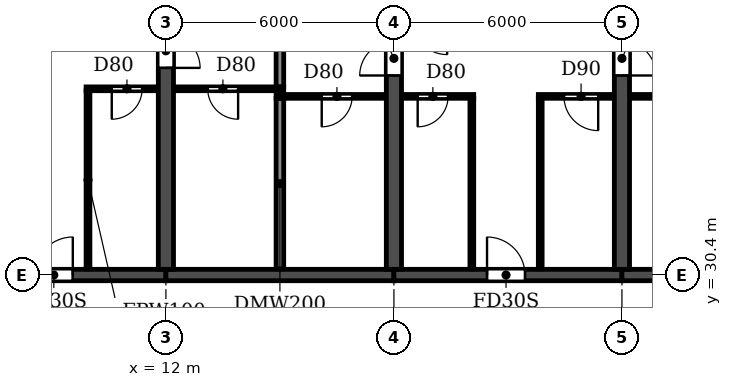
"""IFC4 building model, lengths in metres.
Left out: names, types, materials, properties, quantities, classifications, styles, units other than length and angle.
Written with IfcOpenShell. Run it as: python <this file> out.ifc"""

import sys

from ifc_helpers import new_model, si_unit, direction, frame, frame_2d, origin, place, context, subcontext, project, spatial, rectangle, extrude, element, fill, save


model = new_model("IFC4")
c1 = context("Model", 3, precision=1e-05, world=origin(), true_north=direction((0.0, 1.0)))
c2 = subcontext(c1, "Body", "Model", "MODEL_VIEW")
j1 = project(units=[si_unit("LENGTHUNIT", "METRE"), si_unit("PLANEANGLEUNIT", "RADIAN")], contexts=[c1])
p1 = place(None, origin())
s1 = spatial("IfcSite", under=j1, at=p1, CompositionType="ELEMENT")
p2 = place(p1, origin())
s2 = spatial("IfcBuilding", under=s1, at=p2, CompositionType="ELEMENT")
p3 = place(p2, frame((0.0, 0.0, 43.2)))
s3 = spatial("IfcBuildingStorey", under=s2, at=p3, CompositionType="ELEMENT", Elevation=43.2)
p4 = place(p3, frame((12.0, 30.55, 0.0), z_axis=(0.0, 0.0, 1.0), x_axis=(0.0, 1.0, 0.0)))
e1 = element("IfcWall", 1, at=p4, inside=s3, PredefinedType="SHEAR", context=c2, shape_type="SweptSolid", body=[
    extrude(rectangle(XDim=14.05, YDim=0.4, at=frame_2d((7.025, 0.0))), origin(), (0.0, 0.0, 1.0), 3.05),
])
p5 = place(p4, frame((5.3, 0.0, 0.0)))
e2 = element("IfcOpeningElement", 2, at=p5, cuts=e1, PredefinedType="OPENING", context=c2, shape_type="SweptSolid", body=[
    extrude(rectangle(XDim=0.9, YDim=2.1, at=frame_2d((0.45, 1.05))), frame((0.0, 0.21, 0.0), z_axis=(0.0, -1.0, 0.0), x_axis=(1.0, 0.0, 0.0)), (0.0, 0.0, 1.0), 0.42),
])
p6 = place(p3, frame((18.0, 30.55, 0.0), z_axis=(0.0, 0.0, 1.0), x_axis=(0.0, 1.0, 0.0)))
e3 = element("IfcWall", 3, at=p6, inside=s3, PredefinedType="SHEAR", context=c2, shape_type="SweptSolid", body=[
    extrude(rectangle(XDim=14.05, YDim=0.4, at=frame_2d((7.025, 0.0))), origin(), (0.0, 0.0, 1.0), 3.05),
])
p7 = place(p6, frame((5.1, 0.0, 0.0)))
e4 = element("IfcOpeningElement", 4, at=p7, cuts=e3, PredefinedType="OPENING", context=c2, shape_type="SweptSolid", body=[
    extrude(rectangle(XDim=0.9, YDim=2.1, at=frame_2d((0.45, 1.05))), frame((0.0, 0.21, 0.0), z_axis=(0.0, -1.0, 0.0), x_axis=(1.0, 0.0, 0.0)), (0.0, 0.0, 1.0), 0.42),
])
p8 = place(p3, frame((24.0, 30.55, 0.0), z_axis=(0.0, 0.0, 1.0), x_axis=(0.0, 1.0, 0.0)))
e5 = element("IfcWall", 5, at=p8, inside=s3, PredefinedType="SHEAR", context=c2, shape_type="SweptSolid", body=[
    extrude(rectangle(XDim=14.05, YDim=0.4, at=frame_2d((7.025, 0.0))), origin(), (0.0, 0.0, 1.0), 3.05),
])
p9 = place(p8, frame((5.1, 0.0, 0.0)))
e6 = element("IfcOpeningElement", 6, at=p9, cuts=e5, PredefinedType="OPENING", context=c2, shape_type="SweptSolid", body=[
    extrude(rectangle(XDim=0.9, YDim=2.1, at=frame_2d((0.45, 1.05))), frame((0.0, 0.21, 0.0), z_axis=(0.0, -1.0, 0.0), x_axis=(1.0, 0.0, 0.0)), (0.0, 0.0, 1.0), 0.42),
])
p10 = place(p3, frame((6.0, 30.4, 0.0), z_axis=(0.0, 0.0, 1.0), x_axis=(1.0, 0.0, 0.0)))
e7 = element("IfcWall", 7, at=p10, inside=s3, PredefinedType="SHEAR", context=c2, shape_type="SweptSolid", body=[
    extrude(rectangle(XDim=6.0, YDim=0.3, at=frame_2d((3.0, 0.0))), origin(), (0.0, 0.0, 1.0), 2.45),
])
p11 = place(p10, frame((2.55, 0.0, 0.0)))
e8 = element("IfcOpeningElement", 8, at=p11, cuts=e7, PredefinedType="OPENING", context=c2, shape_type="SweptSolid", body=[
    extrude(rectangle(XDim=1.0, YDim=2.1, at=frame_2d((0.5, 1.05))), frame((0.0, 0.16, 0.0), z_axis=(0.0, -1.0, 0.0), x_axis=(1.0, 0.0, 0.0)), (0.0, 0.0, 1.0), 0.32),
])
p12 = place(p3, frame((12.0, 30.4, 0.0), z_axis=(0.0, 0.0, 1.0), x_axis=(1.0, 0.0, 0.0)))
e9 = element("IfcWall", 9, at=p12, inside=s3, PredefinedType="SHEAR", context=c2, shape_type="SweptSolid", body=[
    extrude(rectangle(XDim=6.0, YDim=0.3, at=frame_2d((3.0, 0.0))), origin(), (0.0, 0.0, 1.0), 2.45),
])
p13 = place(p3, frame((18.0, 30.4, 0.0), z_axis=(0.0, 0.0, 1.0), x_axis=(1.0, 0.0, 0.0)))
e10 = element("IfcWall", 10, at=p13, inside=s3, PredefinedType="SHEAR", context=c2, shape_type="SweptSolid", body=[
    extrude(rectangle(XDim=6.0, YDim=0.3, at=frame_2d((3.0, 0.0))), origin(), (0.0, 0.0, 1.0), 2.45),
])
p14 = place(p13, frame((2.45, 0.0, 0.0)))
e11 = element("IfcOpeningElement", 11, at=p14, cuts=e10, PredefinedType="OPENING", context=c2, shape_type="SweptSolid", body=[
    extrude(rectangle(XDim=1.0, YDim=2.1, at=frame_2d((0.5, 1.05))), frame((0.0, 0.16, 0.0), z_axis=(0.0, -1.0, 0.0), x_axis=(1.0, 0.0, 0.0)), (0.0, 0.0, 1.0), 0.32),
])
p15 = place(p3, frame((24.0, 30.4, 0.0), z_axis=(0.0, 0.0, 1.0), x_axis=(1.0, 0.0, 0.0)))
e12 = element("IfcWall", 12, at=p15, inside=s3, PredefinedType="SHEAR", context=c2, shape_type="SweptSolid", body=[
    extrude(rectangle(XDim=6.0, YDim=0.3, at=frame_2d((3.0, 0.0))), origin(), (0.0, 0.0, 1.0), 2.45),
])
p16 = place(p3, frame((15.0, 30.56, 0.0), z_axis=(0.0, 0.0, 1.0), x_axis=(0.0, 1.0, 0.0)))
e13 = element("IfcWall", 13, at=p16, inside=s3, PredefinedType="PARTITIONING", context=c2, shape_type="SweptSolid", body=[
    extrude(rectangle(XDim=4.49, YDim=0.2, at=frame_2d((2.245, 0.0))), origin(), (0.0, 0.0, 1.0), 3.05),
])
p17 = place(p3, frame((15.0, 35.35, 0.0), z_axis=(0.0, 0.0, 1.0), x_axis=(0.0, 1.0, 0.0)))
e14 = element("IfcWall", 14, at=p17, inside=s3, PredefinedType="PARTITIONING", context=c2, shape_type="SweptSolid", body=[
    extrude(rectangle(XDim=9.39, YDim=0.2, at=frame_2d((4.695, 0.0))), origin(), (0.0, 0.0, 1.0), 3.05),
])
p18 = place(p3, frame((14.9, 35.1, 0.0), z_axis=(0.0, 0.0, 1.0), x_axis=(1.0, 0.0, 0.0)))
e15 = element("IfcWall", 15, at=p18, inside=s3, PredefinedType="PARTITIONING", context=c2, shape_type="SweptSolid", body=[
    extrude(rectangle(XDim=2.89, YDim=0.1, at=frame_2d((1.445, 0.0))), origin(), (0.0, 0.0, 1.0), 3.05),
])
p19 = place(p18, frame((1.2, 0.0, 0.0)))
e16 = element("IfcOpeningElement", 16, at=p19, cuts=e15, PredefinedType="OPENING", context=c2, shape_type="SweptSolid", body=[
    extrude(rectangle(XDim=0.8, YDim=2.1, at=frame_2d((0.4, 1.05))), frame((0.0, 0.06, 0.0), z_axis=(0.0, -1.0, 0.0), x_axis=(1.0, 0.0, 0.0)), (0.0, 0.0, 1.0), 0.12),
])
p20 = place(p3, frame((18.21, 35.1, 0.0), z_axis=(0.0, 0.0, 1.0), x_axis=(1.0, 0.0, 0.0)))
e17 = element("IfcWall", 17, at=p20, inside=s3, PredefinedType="PARTITIONING", context=c2, shape_type="SweptSolid", body=[
    extrude(rectangle(XDim=1.89, YDim=0.1, at=frame_2d((0.945, 0.0))), origin(), (0.0, 0.0, 1.0), 3.05),
])
p21 = place(p20, frame((0.415, 0.0, 0.0)))
e18 = element("IfcOpeningElement", 18, at=p21, cuts=e17, PredefinedType="OPENING", context=c2, shape_type="SweptSolid", body=[
    extrude(rectangle(XDim=0.8, YDim=2.1, at=frame_2d((0.4, 1.05))), frame((0.0, 0.06, 0.0), z_axis=(0.0, -1.0, 0.0), x_axis=(1.0, 0.0, 0.0)), (0.0, 0.0, 1.0), 0.12),
])
p22 = place(p3, frame((21.8, 35.1, 0.0), z_axis=(0.0, 0.0, 1.0), x_axis=(1.0, 0.0, 0.0)))
e19 = element("IfcWall", 19, at=p22, inside=s3, PredefinedType="PARTITIONING", context=c2, shape_type="SweptSolid", body=[
    extrude(rectangle(XDim=1.99, YDim=0.1, at=frame_2d((0.995, 0.0))), origin(), (0.0, 0.0, 1.0), 3.05),
])
p23 = place(p22, frame((0.675, 0.0, 0.0)))
e20 = element("IfcOpeningElement", 20, at=p23, cuts=e19, PredefinedType="OPENING", context=c2, shape_type="SweptSolid", body=[
    extrude(rectangle(XDim=0.9, YDim=2.1, at=frame_2d((0.45, 1.05))), frame((0.0, 0.06, 0.0), z_axis=(0.0, -1.0, 0.0), x_axis=(1.0, 0.0, 0.0)), (0.0, 0.0, 1.0), 0.12),
])
p24 = place(p3, frame((24.21, 35.1, 0.0), z_axis=(0.0, 0.0, 1.0), x_axis=(1.0, 0.0, 0.0)))
e21 = element("IfcWall", 21, at=p24, inside=s3, PredefinedType="PARTITIONING", context=c2, shape_type="SweptSolid", body=[
    extrude(rectangle(XDim=2.69, YDim=0.1, at=frame_2d((1.345, 0.0))), origin(), (0.0, 0.0, 1.0), 3.05),
])
p25 = place(p24, frame((0.89, 0.0, 0.0)))
e22 = element("IfcOpeningElement", 22, at=p25, cuts=e21, PredefinedType="OPENING", context=c2, shape_type="SweptSolid", body=[
    extrude(rectangle(XDim=0.8, YDim=2.1, at=frame_2d((0.4, 1.05))), frame((0.0, 0.06, 0.0), z_axis=(0.0, -1.0, 0.0), x_axis=(1.0, 0.0, 0.0)), (0.0, 0.0, 1.0), 0.12),
])
p26 = place(p3, frame((9.9, 35.3, 0.0), z_axis=(0.0, 0.0, 1.0), x_axis=(1.0, 0.0, 0.0)))
e23 = element("IfcWall", 23, at=p26, inside=s3, PredefinedType="PARTITIONING", context=c2, shape_type="SweptSolid", body=[
    extrude(rectangle(XDim=1.89, YDim=0.1, at=frame_2d((0.945, 0.0))), origin(), (0.0, 0.0, 1.0), 3.05),
])
p27 = place(p26, frame((0.675, 0.0, 0.0)))
e24 = element("IfcOpeningElement", 24, at=p27, cuts=e23, PredefinedType="OPENING", context=c2, shape_type="SweptSolid", body=[
    extrude(rectangle(XDim=0.8, YDim=2.1, at=frame_2d((0.4, 1.05))), frame((0.0, 0.06, 0.0), z_axis=(0.0, -1.0, 0.0), x_axis=(1.0, 0.0, 0.0)), (0.0, 0.0, 1.0), 0.12),
])
p28 = place(p3, frame((12.21, 35.3, 0.0), z_axis=(0.0, 0.0, 1.0), x_axis=(1.0, 0.0, 0.0)))
e25 = element("IfcWall", 25, at=p28, inside=s3, PredefinedType="PARTITIONING", context=c2, shape_type="SweptSolid", body=[
    extrude(rectangle(XDim=2.89, YDim=0.1, at=frame_2d((1.445, 0.0))), origin(), (0.0, 0.0, 1.0), 3.05),
])
p29 = place(p28, frame((0.89, 0.0, 0.0)))
e26 = element("IfcOpeningElement", 26, at=p29, cuts=e25, PredefinedType="OPENING", context=c2, shape_type="SweptSolid", body=[
    extrude(rectangle(XDim=0.8, YDim=2.1, at=frame_2d((0.4, 1.05))), frame((0.0, 0.06, 0.0), z_axis=(0.0, -1.0, 0.0), x_axis=(1.0, 0.0, 0.0)), (0.0, 0.0, 1.0), 0.12),
])
p30 = place(p3, frame((9.95, 30.56, 0.0), z_axis=(0.0, 0.0, 1.0), x_axis=(0.0, 1.0, 0.0)))
e27 = element("IfcWall", 27, at=p30, inside=s3, PredefinedType="PARTITIONING", context=c2, shape_type="SweptSolid", body=[
    extrude(rectangle(XDim=4.69, YDim=0.1, at=frame_2d((2.345, 0.0))), origin(), (0.0, 0.0, 1.0), 3.05),
])
for number, where, z_axis, x_axis in (
    (28, (20.05, 30.56, 0.0), (0.0, 0.0, 1.0), (0.0, 1.0, 0.0)),
    (29, (21.85, 30.56, 0.0), (0.0, 0.0, 1.0), (0.0, 1.0, 0.0)),
):
    element("IfcWall", number, at=place(p3, frame(where, z_axis=z_axis, x_axis=x_axis)), inside=s3, PredefinedType="PARTITIONING", context=c2, shape_type="SweptSolid", body=[
        extrude(rectangle(XDim=4.49, YDim=0.1, at=frame_2d((2.245, 0.0))), origin(), (0.0, 0.0, 1.0), 3.05),
    ])
p31 = place(p29, frame((0.8, 0.0, 0.0), z_axis=(0.0, 0.0, 1.0), x_axis=(-1.0, 0.0, 0.0)))
e30 = element("IfcDoor", 30, at=p31, inside=s3, OperationType="SINGLE_SWING_LEFT", PredefinedType="DOOR", context=c2, shape_type="SweptSolid", body=[
    extrude(rectangle(XDim=0.8, YDim=2.1, at=frame_2d((0.4, 1.05))), frame((0.0, 0.025, 0.0), z_axis=(0.0, -1.0, 0.0), x_axis=(1.0, 0.0, 0.0)), (0.0, 0.0, 1.0), 0.05),
])
fill(e26, e30)
p32 = place(p11, origin())
e31 = element("IfcDoor", 31, at=p32, inside=s3, OperationType="SINGLE_SWING_RIGHT", PredefinedType="DOOR", context=c2, shape_type="SweptSolid", body=[
    extrude(rectangle(XDim=1.0, YDim=2.1, at=frame_2d((0.5, 1.05))), frame((0.0, 0.025, 0.0), z_axis=(0.0, -1.0, 0.0), x_axis=(1.0, 0.0, 0.0)), (0.0, 0.0, 1.0), 0.05),
])
fill(e8, e31)
p33 = place(p27, frame((0.8, 0.0, 0.0), z_axis=(0.0, 0.0, 1.0), x_axis=(-1.0, 0.0, 0.0)))
e32 = element("IfcDoor", 32, at=p33, inside=s3, OperationType="SINGLE_SWING_RIGHT", PredefinedType="DOOR", context=c2, shape_type="SweptSolid", body=[
    extrude(rectangle(XDim=0.8, YDim=2.1, at=frame_2d((0.4, 1.05))), frame((0.0, 0.025, 0.0), z_axis=(0.0, -1.0, 0.0), x_axis=(1.0, 0.0, 0.0)), (0.0, 0.0, 1.0), 0.05),
])
fill(e24, e32)
p34 = place(p5, frame((0.9, 0.0, 0.0), z_axis=(0.0, 0.0, 1.0), x_axis=(-1.0, 0.0, 0.0)))
e33 = element("IfcDoor", 33, at=p34, inside=s3, OperationType="SINGLE_SWING_RIGHT", PredefinedType="DOOR", context=c2, shape_type="SweptSolid", body=[
    extrude(rectangle(XDim=0.9, YDim=2.1, at=frame_2d((0.45, 1.05))), frame((0.0, 0.025, 0.0), z_axis=(0.0, -1.0, 0.0), x_axis=(1.0, 0.0, 0.0)), (0.0, 0.0, 1.0), 0.05),
])
fill(e2, e33)
p35 = place(p19, frame((0.8, 0.0, 0.0), z_axis=(0.0, 0.0, 1.0), x_axis=(-1.0, 0.0, 0.0)))
e34 = element("IfcDoor", 34, at=p35, inside=s3, OperationType="SINGLE_SWING_RIGHT", PredefinedType="DOOR", context=c2, shape_type="SweptSolid", body=[
    extrude(rectangle(XDim=0.8, YDim=2.1, at=frame_2d((0.4, 1.05))), frame((0.0, 0.025, 0.0), z_axis=(0.0, -1.0, 0.0), x_axis=(1.0, 0.0, 0.0)), (0.0, 0.0, 1.0), 0.05),
])
fill(e16, e34)
p36 = place(p7, origin())
e35 = element("IfcDoor", 35, at=p36, inside=s3, OperationType="SINGLE_SWING_LEFT", PredefinedType="DOOR", context=c2, shape_type="SweptSolid", body=[
    extrude(rectangle(XDim=0.9, YDim=2.1, at=frame_2d((0.45, 1.05))), frame((0.0, 0.025, 0.0), z_axis=(0.0, -1.0, 0.0), x_axis=(1.0, 0.0, 0.0)), (0.0, 0.0, 1.0), 0.05),
])
fill(e4, e35)
p37 = place(p21, frame((0.8, 0.0, 0.0), z_axis=(0.0, 0.0, 1.0), x_axis=(-1.0, 0.0, 0.0)))
e36 = element("IfcDoor", 36, at=p37, inside=s3, OperationType="SINGLE_SWING_RIGHT", PredefinedType="DOOR", context=c2, shape_type="SweptSolid", body=[
    extrude(rectangle(XDim=0.8, YDim=2.1, at=frame_2d((0.4, 1.05))), frame((0.0, 0.025, 0.0), z_axis=(0.0, -1.0, 0.0), x_axis=(1.0, 0.0, 0.0)), (0.0, 0.0, 1.0), 0.05),
])
fill(e18, e36)
p38 = place(p14, origin())
e37 = element("IfcDoor", 37, at=p38, inside=s3, OperationType="SINGLE_SWING_LEFT", PredefinedType="DOOR", context=c2, shape_type="SweptSolid", body=[
    extrude(rectangle(XDim=1.0, YDim=2.1, at=frame_2d((0.5, 1.05))), frame((0.0, 0.025, 0.0), z_axis=(0.0, -1.0, 0.0), x_axis=(1.0, 0.0, 0.0)), (0.0, 0.0, 1.0), 0.05),
])
fill(e11, e37)
p39 = place(p23, frame((0.9, 0.0, 0.0), z_axis=(0.0, 0.0, 1.0), x_axis=(-1.0, 0.0, 0.0)))
e38 = element("IfcDoor", 38, at=p39, inside=s3, OperationType="SINGLE_SWING_LEFT", PredefinedType="DOOR", context=c2, shape_type="SweptSolid", body=[
    extrude(rectangle(XDim=0.9, YDim=2.1, at=frame_2d((0.45, 1.05))), frame((0.0, 0.025, 0.0), z_axis=(0.0, -1.0, 0.0), x_axis=(1.0, 0.0, 0.0)), (0.0, 0.0, 1.0), 0.05),
])
fill(e20, e38)
p40 = place(p9, frame((0.9, 0.0, 0.0), z_axis=(0.0, 0.0, 1.0), x_axis=(-1.0, 0.0, 0.0)))
e39 = element("IfcDoor", 39, at=p40, inside=s3, OperationType="SINGLE_SWING_RIGHT", PredefinedType="DOOR", context=c2, shape_type="SweptSolid", body=[
    extrude(rectangle(XDim=0.9, YDim=2.1, at=frame_2d((0.45, 1.05))), frame((0.0, 0.025, 0.0), z_axis=(0.0, -1.0, 0.0), x_axis=(1.0, 0.0, 0.0)), (0.0, 0.0, 1.0), 0.05),
])
fill(e6, e39)
save(model, sys.argv[1])
